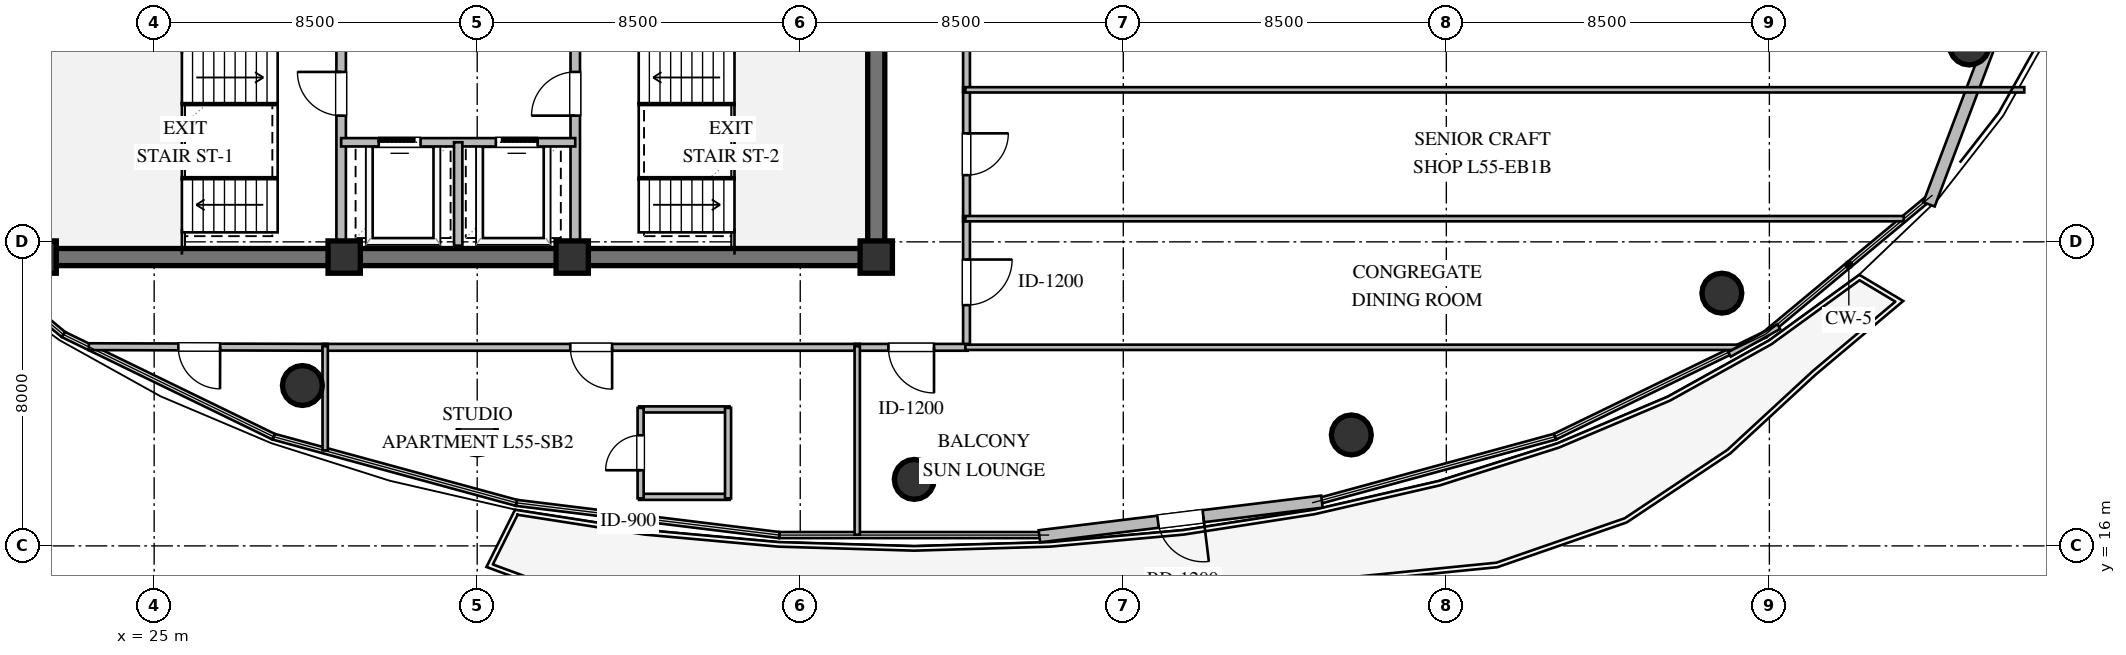
"""IFC4 building model, lengths in metres.
Left out: names, types, materials, properties, quantities, classifications, styles, units other than length and angle.
Written with IfcOpenShell. Run it as: python <this file> out.ifc"""

import sys

from ifc_helpers import new_model, si_unit, direction, frame, frame_2d, origin, origin_2d, place, context, subcontext, project, spatial, rectangle, circle, extrude, element, fill, save


model = new_model("IFC4")
c1 = context("Model", 3, precision=1e-05, world=origin(), true_north=direction((0.0, 1.0)))
c2 = subcontext(c1, "Body", "Model", "MODEL_VIEW")
j1 = project(units=[si_unit("LENGTHUNIT", "METRE"), si_unit("PLANEANGLEUNIT", "RADIAN")], contexts=[c1])
p1 = place(None, origin())
s1 = spatial("IfcSite", under=j1, at=p1, CompositionType="ELEMENT")
p2 = place(p1, origin())
s2 = spatial("IfcBuilding", under=s1, at=p2, CompositionType="ELEMENT")
p3 = place(p2, frame((0.0, 0.0, 210.0)))
s3 = spatial("IfcBuildingStorey", under=s2, at=p3, CompositionType="ELEMENT", Elevation=210.0)
p4 = place(p3, frame((21.775, 23.6, 0.0), z_axis=(0.0, 0.0, 1.0), x_axis=(1.0, 0.0, 0.0)))
e1 = element("IfcWall", 1, at=p4, inside=s3, PredefinedType="SHEAR", context=c2, shape_type="SweptSolid", body=[
    extrude(rectangle(XDim=22.45, YDim=0.45, at=frame_2d((11.225, 0.0))), origin(), (0.0, 0.0, 1.0), 3.36),
])
p5 = place(p3, frame((44.0, 23.825, 0.0), z_axis=(0.0, 0.0, 1.0), x_axis=(0.0, 1.0, 0.0)))
e2 = element("IfcWall", 2, at=p5, inside=s3, PredefinedType="SHEAR", context=c2, shape_type="SweptSolid", body=[
    extrude(rectangle(XDim=12.35, YDim=0.45, at=frame_2d((6.175, 0.0))), origin(), (0.0, 0.0, 1.0), 3.36),
])
p6 = place(p5, frame((8.675, 0.0, 0.0)))
e3 = element("IfcOpeningElement", 3, at=p6, cuts=e2, PredefinedType="OPENING", context=c2, shape_type="SweptSolid", body=[
    extrude(rectangle(XDim=1.5, YDim=2.15, at=frame_2d((0.75, 1.075))), frame((0.0, 0.235, 0.0), z_axis=(0.0, -1.0, 0.0), x_axis=(1.0, 0.0, 0.0)), (0.0, 0.0, 1.0), 0.47),
])
for number, where, z_axis, x_axis in (
    (4, (22.0, 23.6, 0.0), (0.0, 0.0, 1.0), (1.0, 0.0, 0.0)),
    (5, (30.0, 23.6, 0.0), (0.0, 0.0, 1.0), (1.0, 0.0, 0.0)),
    (6, (36.0, 23.6, 0.0), (0.0, 0.0, 1.0), (1.0, 0.0, 0.0)),
    (7, (44.0, 23.6, 0.0), (0.0, 0.0, 1.0), (1.0, 0.0, 0.0)),
):
    element("IfcColumn", number, at=place(p3, frame(where, z_axis=z_axis, x_axis=x_axis)), inside=s3, PredefinedType="COLUMN", context=c2, shape_type="SweptSolid", body=[
        extrude(rectangle(XDim=0.85, YDim=0.85, at=origin_2d()), origin(), (0.0, 0.0, 1.0), 3.6),
    ])
for number, where, z_axis, x_axis in (
    (8, (28.9, 20.22, 0.0), (0.0, 0.0, 1.0), (1.0, 0.0, 0.0)),
    (9, (33.5, 18.92, 0.0), (0.0, 0.0, 1.0), (1.0, 0.0, 0.0)),
    (10, (45.0, 17.75, 0.0), (0.0, 0.0, 1.0), (1.0, 0.0, 0.0)),
    (11, (56.5, 18.92, 0.0), (0.0, 0.0, 1.0), (1.0, 0.0, 0.0)),
    (12, (66.25, 22.65, 0.0), (0.0, 0.0, 1.0), (1.0, 0.0, 0.0)),
    (13, (72.76, 29.18, 0.0), (0.0, 0.0, 1.0), (1.0, 0.0, 0.0)),
):
    element("IfcColumn", number, at=place(p3, frame(where, z_axis=z_axis, x_axis=x_axis)), inside=s3, PredefinedType="COLUMN", context=c2, shape_type="SweptSolid", body=[
        extrude(circle(Radius=0.525, at=origin_2d()), origin(), (0.0, 0.0, 1.0), 3.6),
    ])
p7 = place(p3, frame((76.712, 38.243, 0.0), z_axis=(0.0, 0.0, 1.0), x_axis=(-0.353659523244, -0.935374225441, 0.0)))
e14 = element("IfcWall", 14, at=p7, inside=s3, PredefinedType="STANDARD", context=c2, shape_type="SweptSolid", body=[
    extrude(rectangle(XDim=14.172, YDim=0.32, at=frame_2d((7.086, 0.0))), origin(), (0.0, 0.0, 1.0), 3.36),
])
p8 = place(p3, frame((55.727, 17.165, 0.0), z_axis=(0.0, 0.0, 1.0), x_axis=(-0.992559081031, -0.121763995755, 0.0)))
e15 = element("IfcWall", 15, at=p8, inside=s3, PredefinedType="STANDARD", context=c2, shape_type="SweptSolid", body=[
    extrude(rectangle(XDim=7.491, YDim=0.32, at=frame_2d((3.745, 0.0))), origin(), (0.0, 0.0, 1.0), 3.36),
])
p9 = place(p8, frame((3.145, 0.0, 0.0)))
e16 = element("IfcOpeningElement", 16, at=p9, cuts=e15, PredefinedType="OPENING", context=c2, shape_type="SweptSolid", body=[
    extrude(rectangle(XDim=1.2, YDim=2.15, at=frame_2d((0.6, 1.075))), frame((0.0, 0.17, 0.0), z_axis=(0.0, -1.0, 0.0), x_axis=(1.0, 0.0, 0.0)), (0.0, 0.0, 1.0), 0.34),
])
p10 = place(p3, frame((29.92, 23.9, 0.0), z_axis=(0.0, 0.0, 1.0), x_axis=(0.0, 1.0, 0.0)))
e17 = element("IfcWall", 17, at=p10, inside=s3, PredefinedType="SOLIDWALL", context=c2, shape_type="SweptSolid", body=[
    extrude(rectangle(XDim=5.4, YDim=0.25, at=frame_2d((2.7, 0.0))), origin(), (0.0, 0.0, 1.0), 3.36),
])
p11 = place(p10, frame((3.421, 0.0, 0.0)))
e18 = element("IfcOpeningElement", 18, at=p11, cuts=e17, PredefinedType="OPENING", context=c2, shape_type="SweptSolid", body=[
    extrude(rectangle(XDim=1.15, YDim=2.1, at=frame_2d((0.575, 1.05))), frame((0.0, 0.135, 0.0), z_axis=(0.0, -1.0, 0.0), x_axis=(1.0, 0.0, 0.0)), (0.0, 0.0, 1.0), 0.27),
])
p12 = place(p3, frame((36.08, 23.9, 0.0), z_axis=(0.0, 0.0, 1.0), x_axis=(0.0, 1.0, 0.0)))
e19 = element("IfcWall", 19, at=p12, inside=s3, PredefinedType="SOLIDWALL", context=c2, shape_type="SweptSolid", body=[
    extrude(rectangle(XDim=5.4, YDim=0.25, at=frame_2d((2.7, 0.0))), origin(), (0.0, 0.0, 1.0), 3.36),
])
p13 = place(p12, frame((3.421, 0.0, 0.0)))
e20 = element("IfcOpeningElement", 20, at=p13, cuts=e19, PredefinedType="OPENING", context=c2, shape_type="SweptSolid", body=[
    extrude(rectangle(XDim=1.15, YDim=2.1, at=frame_2d((0.575, 1.05))), frame((0.0, 0.135, 0.0), z_axis=(0.0, -1.0, 0.0), x_axis=(1.0, 0.0, 0.0)), (0.0, 0.0, 1.0), 0.27),
])
p14 = place(p3, frame((29.92, 26.62, 0.0), z_axis=(0.0, 0.0, 1.0), x_axis=(1.0, 0.0, 0.0)))
e21 = element("IfcWall", 21, at=p14, inside=s3, PredefinedType="SOLIDWALL", context=c2, shape_type="SweptSolid", body=[
    extrude(rectangle(XDim=6.16, YDim=0.22, at=frame_2d((3.08, 0.0))), origin(), (0.0, 0.0, 1.0), 3.36),
])
p15 = place(p14, frame((0.99, 0.0, 0.0)))
e22 = element("IfcOpeningElement", 22, at=p15, cuts=e21, PredefinedType="OPENING", context=c2, shape_type="SweptSolid", body=[
    extrude(rectangle(XDim=1.1, YDim=2.1, at=frame_2d((0.55, 1.05))), frame((0.0, 0.12, 0.0), z_axis=(0.0, -1.0, 0.0), x_axis=(1.0, 0.0, 0.0)), (0.0, 0.0, 1.0), 0.24),
])
p16 = place(p14, frame((4.07, 0.0, 0.0)))
e23 = element("IfcOpeningElement", 23, at=p16, cuts=e21, PredefinedType="OPENING", context=c2, shape_type="SweptSolid", body=[
    extrude(rectangle(XDim=1.1, YDim=2.1, at=frame_2d((0.55, 1.05))), frame((0.0, 0.12, 0.0), z_axis=(0.0, -1.0, 0.0), x_axis=(1.0, 0.0, 0.0)), (0.0, 0.0, 1.0), 0.24),
])
p17 = place(p3, frame((33.0, 23.9, 0.0), z_axis=(0.0, 0.0, 1.0), x_axis=(0.0, 1.0, 0.0)))
e24 = element("IfcWall", 24, at=p17, inside=s3, PredefinedType="SOLIDWALL", context=c2, shape_type="SweptSolid", body=[
    extrude(rectangle(XDim=2.72, YDim=0.22, at=frame_2d((1.36, 0.0))), origin(), (0.0, 0.0, 1.0), 3.36),
])
for number, where, z_axis, x_axis in (
    (25, (37.76, 17.291, 0.0), (0.0, 0.0, 1.0), (1.0, 0.0, 0.0)),
    (26, (37.76, 19.591, 0.0), (0.0, 0.0, 1.0), (1.0, 0.0, 0.0)),
):
    element("IfcWall", number, at=place(p3, frame(where, z_axis=z_axis, x_axis=x_axis)), inside=s3, PredefinedType="PLUMBINGWALL", context=c2, shape_type="SweptSolid", body=[
        extrude(rectangle(XDim=2.38, YDim=0.16, at=frame_2d((1.19, 0.0))), origin(), (0.0, 0.0, 1.0), 3.36),
    ])
p18 = place(p3, frame((37.8, 17.251, 0.0), z_axis=(0.0, 0.0, 1.0), x_axis=(0.0, 1.0, 0.0)))
e27 = element("IfcWall", 27, at=p18, inside=s3, PredefinedType="PLUMBINGWALL", context=c2, shape_type="SweptSolid", body=[
    extrude(rectangle(XDim=2.38, YDim=0.16, at=frame_2d((1.19, 0.0))), origin(), (0.0, 0.0, 1.0), 3.36),
])
p19 = place(p18, frame((0.74, 0.0, 0.0)))
e28 = element("IfcOpeningElement", 28, at=p19, cuts=e27, PredefinedType="OPENING", context=c2, shape_type="SweptSolid", body=[
    extrude(rectangle(XDim=0.92, YDim=2.1, at=frame_2d((0.46, 1.05))), frame((0.0, 0.09, 0.0), z_axis=(0.0, -1.0, 0.0), x_axis=(1.0, 0.0, 0.0)), (0.0, 0.0, 1.0), 0.18),
])
p20 = place(p3, frame((40.1, 17.251, 0.0), z_axis=(0.0, 0.0, 1.0), x_axis=(0.0, 1.0, 0.0)))
e29 = element("IfcWall", 29, at=p20, inside=s3, PredefinedType="PLUMBINGWALL", context=c2, shape_type="SweptSolid", body=[
    extrude(rectangle(XDim=2.38, YDim=0.16, at=frame_2d((1.19, 0.0))), origin(), (0.0, 0.0, 1.0), 3.36),
])
p21 = place(p3, frame((46.375, 24.675, 0.0), z_axis=(0.0, 0.0, 1.0), x_axis=(0.0, -1.0, 0.0)))
e30 = element("IfcWall", 30, at=p21, inside=s3, PredefinedType="PARTITIONING", context=c2, shape_type="SweptSolid", body=[
    extrude(rectangle(XDim=3.48, YDim=0.18, at=frame_2d((1.74, 0.0))), origin(), (0.0, 0.0, 1.0), 3.36),
])
p22 = place(p21, frame((1.14, 0.0, 0.0)))
e31 = element("IfcOpeningElement", 31, at=p22, cuts=e30, PredefinedType="OPENING", context=c2, shape_type="SweptSolid", body=[
    extrude(rectangle(XDim=1.2, YDim=2.15, at=frame_2d((0.6, 1.075))), frame((0.0, 0.1, 0.0), z_axis=(0.0, -1.0, 0.0), x_axis=(1.0, 0.0, 0.0)), (0.0, 0.0, 1.0), 0.2),
])
p23 = place(p3, frame((46.375, 28.065, 0.0), z_axis=(0.0, 0.0, 1.0), x_axis=(0.0, -1.0, 0.0)))
e32 = element("IfcWall", 32, at=p23, inside=s3, PredefinedType="PARTITIONING", context=c2, shape_type="SweptSolid", body=[
    extrude(rectangle(XDim=3.52, YDim=0.18, at=frame_2d((1.76, 0.0))), origin(), (0.0, 0.0, 1.0), 3.36),
])
p24 = place(p23, frame((1.21, 0.0, 0.0)))
e33 = element("IfcOpeningElement", 33, at=p24, cuts=e32, PredefinedType="OPENING", context=c2, shape_type="SweptSolid", body=[
    extrude(rectangle(XDim=1.1, YDim=2.1, at=frame_2d((0.55, 1.05))), frame((0.0, 0.1, 0.0), z_axis=(0.0, -1.0, 0.0), x_axis=(1.0, 0.0, 0.0)), (0.0, 0.0, 1.0), 0.2),
])
p25 = place(p3, frame((46.375, 31.565, 0.0), z_axis=(0.0, 0.0, 1.0), x_axis=(0.0, -1.0, 0.0)))
e34 = element("IfcWall", 34, at=p25, inside=s3, PredefinedType="PARTITIONING", context=c2, shape_type="SweptSolid", body=[
    extrude(rectangle(XDim=3.63, YDim=0.18, at=frame_2d((1.815, 0.0))), origin(), (0.0, 0.0, 1.0), 3.36),
])
p26 = place(p25, frame((1.265, 0.0, 0.0)))
e35 = element("IfcOpeningElement", 35, at=p26, cuts=e34, PredefinedType="OPENING", context=c2, shape_type="SweptSolid", body=[
    extrude(rectangle(XDim=1.1, YDim=2.1, at=frame_2d((0.55, 1.05))), frame((0.0, 0.1, 0.0), z_axis=(0.0, -1.0, 0.0), x_axis=(1.0, 0.0, 0.0)), (0.0, 0.0, 1.0), 0.2),
])
p27 = place(p3, frame((29.565, 21.225, 0.0), z_axis=(0.0, 0.0, 1.0), x_axis=(-0.999996509373, 0.002642204019, 0.0)))
e36 = element("IfcWall", 36, at=p27, inside=s3, PredefinedType="PARTITIONING", context=c2, shape_type="SweptSolid", body=[
    extrude(rectangle(XDim=6.283, YDim=0.18, at=frame_2d((3.142, 0.0))), origin(), (0.0, 0.0, 1.0), 2.89),
])
p28 = place(p27, frame((2.829, 0.0, 0.0)))
e37 = element("IfcOpeningElement", 37, at=p28, cuts=e36, PredefinedType="OPENING", context=c2, shape_type="SweptSolid", body=[
    extrude(rectangle(XDim=1.1, YDim=2.1, at=frame_2d((0.55, 1.05))), frame((0.0, 0.1, 0.0), z_axis=(0.0, -1.0, 0.0), x_axis=(1.0, 0.0, 0.0)), (0.0, 0.0, 1.0), 0.2),
])
p29 = place(p3, frame((43.565, 21.225, 0.0), z_axis=(0.0, 0.0, 1.0), x_axis=(-1.0, 0.0, 0.0)))
e38 = element("IfcWall", 38, at=p29, inside=s3, PredefinedType="PARTITIONING", context=c2, shape_type="SweptSolid", body=[
    extrude(rectangle(XDim=14.13, YDim=0.18, at=frame_2d((7.065, 0.0))), origin(), (0.0, 0.0, 1.0), 2.996),
])
p30 = place(p29, frame((6.515, 0.0, 0.0)))
e39 = element("IfcOpeningElement", 39, at=p30, cuts=e38, PredefinedType="OPENING", context=c2, shape_type="SweptSolid", body=[
    extrude(rectangle(XDim=1.1, YDim=2.1, at=frame_2d((0.55, 1.05))), frame((0.0, 0.1, 0.0), z_axis=(0.0, -1.0, 0.0), x_axis=(1.0, 0.0, 0.0)), (0.0, 0.0, 1.0), 0.2),
])
p31 = place(p3, frame((46.405, 21.225, 0.0), z_axis=(0.0, 0.0, 1.0), x_axis=(-1.0, 0.0, 0.0)))
e40 = element("IfcWall", 40, at=p31, inside=s3, PredefinedType="PARTITIONING", context=c2, shape_type="SweptSolid", body=[
    extrude(rectangle(XDim=2.97, YDim=0.18, at=frame_2d((1.485, 0.0))), origin(), (0.0, 0.0, 1.0), 3.36),
])
p32 = place(p31, frame((0.885, 0.0, 0.0)))
e41 = element("IfcOpeningElement", 41, at=p32, cuts=e40, PredefinedType="OPENING", context=c2, shape_type="SweptSolid", body=[
    extrude(rectangle(XDim=1.2, YDim=2.15, at=frame_2d((0.6, 1.075))), frame((0.0, 0.1, 0.0), z_axis=(0.0, -1.0, 0.0), x_axis=(1.0, 0.0, 0.0)), (0.0, 0.0, 1.0), 0.2),
])
p33 = place(p3, frame((46.345, 24.61, 0.0), z_axis=(0.0, 0.0, 1.0), x_axis=(1.0, 0.0, 0.0)))
e42 = element("IfcWall", 42, at=p33, inside=s3, PredefinedType="PARTITIONING", context=c2, shape_type="SweptSolid", body=[
    extrude(rectangle(XDim=24.693, YDim=0.14, at=frame_2d((12.346, 0.0))), origin(), (0.0, 0.0, 1.0), 2.89),
])
p34 = place(p3, frame((66.684, 21.225, 0.0), z_axis=(0.0, 0.0, 1.0), x_axis=(-1.0, 0.0, 0.0)))
e43 = element("IfcWall", 43, at=p34, inside=s3, PredefinedType="PARTITIONING", context=c2, shape_type="SweptSolid", body=[
    extrude(rectangle(XDim=20.339, YDim=0.14, at=frame_2d((10.169, 0.0))), origin(), (0.0, 0.0, 1.0), 2.996),
])
p35 = place(p3, frame((67.748, 21.77, 0.0), z_axis=(0.0, 0.0, 1.0), x_axis=(-0.871352238731, -0.490658003153, 0.0)))
e44 = element("IfcWall", 44, at=p35, inside=s3, PredefinedType="PARTITIONING", context=c2, shape_type="SweptSolid", body=[
    extrude(rectangle(XDim=1.49, YDim=0.14, at=frame_2d((0.745, 0.0))), origin(), (0.0, 0.0, 1.0), 3.36),
])
p36 = place(p3, frame((46.345, 28.0, 0.0), z_axis=(0.0, 0.0, 1.0), x_axis=(1.0, 0.0, 0.0)))
e45 = element("IfcWall", 45, at=p36, inside=s3, PredefinedType="PARTITIONING", context=c2, shape_type="SweptSolid", body=[
    extrude(rectangle(XDim=27.863, YDim=0.14, at=frame_2d((13.932, 0.0))), origin(), (0.0, 0.0, 1.0), 2.89),
])
p37 = place(p3, frame((29.5, 21.255, 0.0), z_axis=(0.0, 0.0, 1.0), x_axis=(0.0, -1.0, 0.0)))
e46 = element("IfcWall", 46, at=p37, inside=s3, PredefinedType="PARTITIONING", context=c2, shape_type="SweptSolid", body=[
    extrude(rectangle(XDim=2.741, YDim=0.14, at=frame_2d((1.371, 0.0))), origin(), (0.0, 0.0, 1.0), 3.36),
])
p38 = place(p3, frame((43.5, 21.255, 0.0), z_axis=(0.0, 0.0, 1.0), x_axis=(0.0, -1.0, 0.0)))
e47 = element("IfcWall", 47, at=p38, inside=s3, PredefinedType="PARTITIONING", context=c2, shape_type="SweptSolid", body=[
    extrude(rectangle(XDim=4.96, YDim=0.14, at=frame_2d((2.48, 0.0))), origin(), (0.0, 0.0, 1.0), 3.36),
])
p39 = place(p9, origin())
e48 = element("IfcDoor", 48, at=p39, inside=s3, OperationType="SINGLE_SWING_LEFT", PredefinedType="DOOR", context=c2, shape_type="SweptSolid", body=[
    extrude(rectangle(XDim=1.2, YDim=2.15, at=frame_2d((0.6, 1.075))), frame((0.0, 0.025, 0.0), z_axis=(0.0, -1.0, 0.0), x_axis=(1.0, 0.0, 0.0)), (0.0, 0.0, 1.0), 0.05),
])
fill(e16, e48)
p40 = place(p11, origin())
e49 = element("IfcDoor", 49, at=p40, inside=s3, OperationType="SINGLE_SWING_RIGHT", PredefinedType="DOOR", context=c2, shape_type="SweptSolid", body=[
    extrude(rectangle(XDim=1.15, YDim=2.1, at=frame_2d((0.575, 1.05))), frame((0.0, 0.025, 0.0), z_axis=(0.0, -1.0, 0.0), x_axis=(1.0, 0.0, 0.0)), (0.0, 0.0, 1.0), 0.05),
])
fill(e18, e49)
p41 = place(p13, origin())
e50 = element("IfcDoor", 50, at=p41, inside=s3, OperationType="SINGLE_SWING_LEFT", PredefinedType="DOOR", context=c2, shape_type="SweptSolid", body=[
    extrude(rectangle(XDim=1.15, YDim=2.1, at=frame_2d((0.575, 1.05))), frame((0.0, 0.025, 0.0), z_axis=(0.0, -1.0, 0.0), x_axis=(1.0, 0.0, 0.0)), (0.0, 0.0, 1.0), 0.05),
])
fill(e20, e50)
p42 = place(p15, origin())
e51 = element("IfcDoor", 51, at=p42, inside=s3, OperationType="SLIDING_TO_LEFT", PredefinedType="DOOR", context=c2, shape_type="SweptSolid", body=[
    extrude(rectangle(XDim=1.1, YDim=2.1, at=frame_2d((0.55, 1.05))), frame((0.0, 0.025, 0.0), z_axis=(0.0, -1.0, 0.0), x_axis=(1.0, 0.0, 0.0)), (0.0, 0.0, 1.0), 0.05),
])
fill(e22, e51)
p43 = place(p16, origin())
e52 = element("IfcDoor", 52, at=p43, inside=s3, OperationType="SLIDING_TO_RIGHT", PredefinedType="DOOR", context=c2, shape_type="SweptSolid", body=[
    extrude(rectangle(XDim=1.1, YDim=2.1, at=frame_2d((0.55, 1.05))), frame((0.0, 0.025, 0.0), z_axis=(0.0, -1.0, 0.0), x_axis=(1.0, 0.0, 0.0)), (0.0, 0.0, 1.0), 0.05),
])
fill(e23, e52)
p44 = place(p19, origin())
e53 = element("IfcDoor", 53, at=p44, inside=s3, OperationType="SINGLE_SWING_LEFT", PredefinedType="DOOR", context=c2, shape_type="SweptSolid", body=[
    extrude(rectangle(XDim=0.92, YDim=2.1, at=frame_2d((0.46, 1.05))), frame((0.0, 0.025, 0.0), z_axis=(0.0, -1.0, 0.0), x_axis=(1.0, 0.0, 0.0)), (0.0, 0.0, 1.0), 0.05),
])
fill(e28, e53)
p45 = place(p22, origin())
e54 = element("IfcDoor", 54, at=p45, inside=s3, OperationType="SINGLE_SWING_LEFT", PredefinedType="DOOR", context=c2, shape_type="SweptSolid", body=[
    extrude(rectangle(XDim=1.2, YDim=2.15, at=frame_2d((0.6, 1.075))), frame((0.0, 0.025, 0.0), z_axis=(0.0, -1.0, 0.0), x_axis=(1.0, 0.0, 0.0)), (0.0, 0.0, 1.0), 0.05),
])
fill(e31, e54)
p46 = place(p24, origin())
e55 = element("IfcDoor", 55, at=p46, inside=s3, OperationType="SINGLE_SWING_LEFT", PredefinedType="DOOR", context=c2, shape_type="SweptSolid", body=[
    extrude(rectangle(XDim=1.1, YDim=2.1, at=frame_2d((0.55, 1.05))), frame((0.0, 0.025, 0.0), z_axis=(0.0, -1.0, 0.0), x_axis=(1.0, 0.0, 0.0)), (0.0, 0.0, 1.0), 0.05),
])
fill(e33, e55)
p47 = place(p28, origin())
e56 = element("IfcDoor", 56, at=p47, inside=s3, OperationType="SINGLE_SWING_LEFT", PredefinedType="DOOR", context=c2, shape_type="SweptSolid", body=[
    extrude(rectangle(XDim=1.1, YDim=2.1, at=frame_2d((0.55, 1.05))), frame((0.0, 0.025, 0.0), z_axis=(0.0, -1.0, 0.0), x_axis=(1.0, 0.0, 0.0)), (0.0, 0.0, 1.0), 0.05),
])
fill(e37, e56)
p48 = place(p30, origin())
e57 = element("IfcDoor", 57, at=p48, inside=s3, OperationType="SINGLE_SWING_LEFT", PredefinedType="DOOR", context=c2, shape_type="SweptSolid", body=[
    extrude(rectangle(XDim=1.1, YDim=2.1, at=frame_2d((0.55, 1.05))), frame((0.0, 0.025, 0.0), z_axis=(0.0, -1.0, 0.0), x_axis=(1.0, 0.0, 0.0)), (0.0, 0.0, 1.0), 0.05),
])
fill(e39, e57)
p49 = place(p32, origin())
e58 = element("IfcDoor", 58, at=p49, inside=s3, OperationType="SINGLE_SWING_LEFT", PredefinedType="DOOR", context=c2, shape_type="SweptSolid", body=[
    extrude(rectangle(XDim=1.2, YDim=2.15, at=frame_2d((0.6, 1.075))), frame((0.0, 0.025, 0.0), z_axis=(0.0, -1.0, 0.0), x_axis=(1.0, 0.0, 0.0)), (0.0, 0.0, 1.0), 0.05),
])
fill(e41, e58)
save(model, sys.argv[1])
